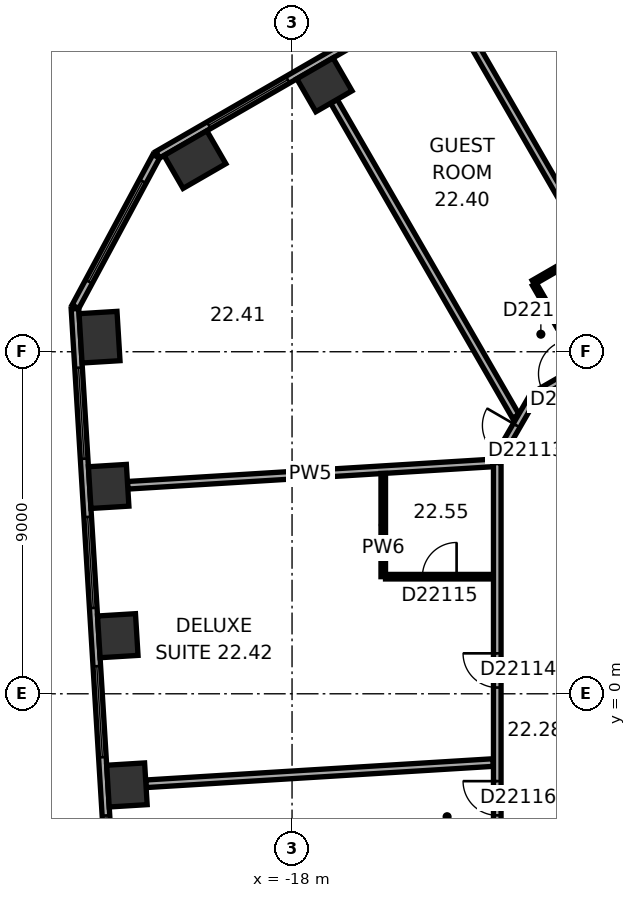
"""IFC4 building model, lengths in metres.
Left out: names, types, materials, properties, quantities, classifications, styles, units other than length and angle.
Written with IfcOpenShell. Run it as: python <this file> out.ifc"""

import sys

from ifc_helpers import new_model, si_unit, direction, frame, frame_2d, origin, origin_2d, place, context, subcontext, project, spatial, rectangle, extrude, element, fill, save


model = new_model("IFC4")
c1 = context("Model", 3, precision=1e-05, world=origin(), true_north=direction((0.0, 1.0)))
c2 = subcontext(c1, "Body", "Model", "MODEL_VIEW")
j1 = project(units=[si_unit("LENGTHUNIT", "METRE"), si_unit("PLANEANGLEUNIT", "RADIAN")], contexts=[c1])
p1 = place(None, origin())
s1 = spatial("IfcSite", under=j1, at=p1, CompositionType="ELEMENT")
p2 = place(p1, origin())
s2 = spatial("IfcBuilding", under=s1, at=p2, CompositionType="ELEMENT")
p3 = place(p2, frame((0.0, 0.0, 96.8)))
s3 = spatial("IfcBuildingStorey", under=s2, at=p3, CompositionType="ELEMENT", Elevation=96.8)
p4 = place(p3, frame((-17.148, 16.023, 0.0), z_axis=(0.0, 0.0, 1.0), x_axis=(-0.866025403784, -0.5, 0.0)))
e1 = element("IfcColumn", 1, at=p4, inside=s3, PredefinedType="COLUMN", context=c2, shape_type="SweptSolid", body=[
    extrude(rectangle(XDim=1.1, YDim=1.0, at=origin_2d()), origin(), (0.0, 0.0, 1.0), 3.3),
])
for number, where, z_axis, x_axis in (
    (2, (-20.555, 14.055, 0.0), (0.0, 0.0, 1.0), (-0.866, -0.5, 0.0)),
    (3, (-23.066, 9.383, 0.0), (0.0, 0.0, 1.0), (0.061, -0.998, 0.0)),
):
    element("IfcColumn", number, at=place(p3, frame(where, z_axis=z_axis, x_axis=x_axis)), inside=s3, PredefinedType="COLUMN", context=c2, shape_type="SweptSolid", body=[
        extrude(rectangle(XDim=1.3, YDim=1.0, at=origin_2d()), origin(), (0.0, 0.0, 1.0), 3.3),
    ])
for number, where, z_axis, x_axis in (
    (4, (-22.826, 5.456, 0.0), (0.0, 0.0, 1.0), (0.061, -0.998, 0.0)),
    (5, (-22.585, 1.529, 0.0), (0.0, 0.0, 1.0), (0.061, -0.998, 0.0)),
    (6, (-22.345, -2.399, 0.0), (0.0, 0.0, 1.0), (0.061, -0.998, 0.0)),
):
    element("IfcColumn", number, at=place(p3, frame(where, z_axis=z_axis, x_axis=x_axis)), inside=s3, PredefinedType="COLUMN", context=c2, shape_type="SweptSolid", body=[
        extrude(rectangle(XDim=1.1, YDim=1.0, at=origin_2d()), origin(), (0.0, 0.0, 1.0), 3.3),
    ])
p5 = place(p3, frame((-3.136, 24.805, 0.0), z_axis=(0.0, 0.0, 1.0), x_axis=(-0.866028291626, -0.499994998079, 0.0)))
e7 = element("IfcWall", 7, at=p5, inside=s3, PredefinedType="STANDARD", context=c2, shape_type="SweptSolid", body=[
    extrude(rectangle(XDim=21.246, YDim=0.2, at=frame_2d((10.623, 0.0))), origin(), (0.0, 0.0, 1.0), 3.3),
])
p6 = place(p5, frame((1.555, 0.0, 0.8)))
e8 = element("IfcOpeningElement", 8, at=p6, cuts=e7, PredefinedType="OPENING", context=c2, shape_type="SweptSolid", body=[
    extrude(rectangle(XDim=2.4, YDim=1.7, at=frame_2d((1.2, 0.85))), frame((0.0, 0.11, 0.0), z_axis=(0.0, -1.0, 0.0), x_axis=(1.0, 0.0, 0.0)), (0.0, 0.0, 1.0), 0.22),
])
p7 = place(p5, frame((5.489, 0.0, 0.8)))
e9 = element("IfcOpeningElement", 9, at=p7, cuts=e7, PredefinedType="OPENING", context=c2, shape_type="SweptSolid", body=[
    extrude(rectangle(XDim=2.4, YDim=1.7, at=frame_2d((1.2, 0.85))), frame((0.0, 0.11, 0.0), z_axis=(0.0, -1.0, 0.0), x_axis=(1.0, 0.0, 0.0)), (0.0, 0.0, 1.0), 0.22),
])
p8 = place(p5, frame((9.424, 0.0, 0.8)))
e10 = element("IfcOpeningElement", 10, at=p8, cuts=e7, PredefinedType="OPENING", context=c2, shape_type="SweptSolid", body=[
    extrude(rectangle(XDim=2.4, YDim=1.7, at=frame_2d((1.2, 0.85))), frame((0.0, 0.11, 0.0), z_axis=(0.0, -1.0, 0.0), x_axis=(1.0, 0.0, 0.0)), (0.0, 0.0, 1.0), 0.22),
])
p9 = place(p5, frame((13.358, 0.0, 0.8)))
e11 = element("IfcOpeningElement", 11, at=p9, cuts=e7, PredefinedType="OPENING", context=c2, shape_type="SweptSolid", body=[
    extrude(rectangle(XDim=2.4, YDim=1.7, at=frame_2d((1.2, 0.85))), frame((0.0, 0.11, 0.0), z_axis=(0.0, -1.0, 0.0), x_axis=(1.0, 0.0, 0.0)), (0.0, 0.0, 1.0), 0.22),
])
p10 = place(p5, frame((17.293, 0.0, 0.8)))
e12 = element("IfcOpeningElement", 12, at=p10, cuts=e7, PredefinedType="OPENING", context=c2, shape_type="SweptSolid", body=[
    extrude(rectangle(XDim=2.4, YDim=1.7, at=frame_2d((1.2, 0.85))), frame((0.0, 0.11, 0.0), z_axis=(0.0, -1.0, 0.0), x_axis=(1.0, 0.0, 0.0)), (0.0, 0.0, 1.0), 0.22),
])
p11 = place(p3, frame((-21.574, 14.143, 0.0), z_axis=(0.0, 0.0, 1.0), x_axis=(-0.473292949472, -0.880905093628, 0.0)))
e13 = element("IfcWall", 13, at=p11, inside=s3, PredefinedType="STANDARD", context=c2, shape_type="SweptSolid", body=[
    extrude(rectangle(XDim=4.494, YDim=0.2, at=frame_2d((2.247, 0.0))), origin(), (0.0, 0.0, 1.0), 3.3),
])
p12 = place(p11, frame((0.747, 0.0, 0.8)))
e14 = element("IfcOpeningElement", 14, at=p12, cuts=e13, PredefinedType="OPENING", context=c2, shape_type="SweptSolid", body=[
    extrude(rectangle(XDim=3.0, YDim=1.7, at=frame_2d((1.5, 0.85))), frame((0.0, 0.11, 0.0), z_axis=(0.0, -1.0, 0.0), x_axis=(1.0, 0.0, 0.0)), (0.0, 0.0, 1.0), 0.22),
])
p13 = place(p3, frame((-23.713, 10.131, 0.0), z_axis=(0.0, 0.0, 1.0), x_axis=(0.061040439785, -0.998135293791, 0.0)))
e15 = element("IfcWall", 15, at=p13, inside=s3, PredefinedType="STANDARD", context=c2, shape_type="SweptSolid", body=[
    extrude(rectangle(XDim=21.246, YDim=0.2, at=frame_2d((10.623, 0.0))), origin(), (0.0, 0.0, 1.0), 3.3),
])
p14 = place(p13, frame((1.553, 0.0, 0.8)))
e16 = element("IfcOpeningElement", 16, at=p14, cuts=e15, PredefinedType="OPENING", context=c2, shape_type="SweptSolid", body=[
    extrude(rectangle(XDim=2.4, YDim=1.7, at=frame_2d((1.2, 0.85))), frame((0.0, 0.11, 0.0), z_axis=(0.0, -1.0, 0.0), x_axis=(1.0, 0.0, 0.0)), (0.0, 0.0, 1.0), 0.22),
])
p15 = place(p13, frame((5.488, 0.0, 0.8)))
e17 = element("IfcOpeningElement", 17, at=p15, cuts=e15, PredefinedType="OPENING", context=c2, shape_type="SweptSolid", body=[
    extrude(rectangle(XDim=2.4, YDim=1.7, at=frame_2d((1.2, 0.85))), frame((0.0, 0.11, 0.0), z_axis=(0.0, -1.0, 0.0), x_axis=(1.0, 0.0, 0.0)), (0.0, 0.0, 1.0), 0.22),
])
p16 = place(p13, frame((9.422, 0.0, 0.8)))
e18 = element("IfcOpeningElement", 18, at=p16, cuts=e15, PredefinedType="OPENING", context=c2, shape_type="SweptSolid", body=[
    extrude(rectangle(XDim=2.4, YDim=1.7, at=frame_2d((1.2, 0.85))), frame((0.0, 0.11, 0.0), z_axis=(0.0, -1.0, 0.0), x_axis=(1.0, 0.0, 0.0)), (0.0, 0.0, 1.0), 0.22),
])
p17 = place(p13, frame((13.357, 0.0, 0.8)))
e19 = element("IfcOpeningElement", 19, at=p17, cuts=e15, PredefinedType="OPENING", context=c2, shape_type="SweptSolid", body=[
    extrude(rectangle(XDim=2.4, YDim=1.7, at=frame_2d((1.2, 0.85))), frame((0.0, 0.11, 0.0), z_axis=(0.0, -1.0, 0.0), x_axis=(1.0, 0.0, 0.0)), (0.0, 0.0, 1.0), 0.22),
])
p18 = place(p13, frame((17.292, 0.0, 0.8)))
e20 = element("IfcOpeningElement", 20, at=p18, cuts=e15, PredefinedType="OPENING", context=c2, shape_type="SweptSolid", body=[
    extrude(rectangle(XDim=2.4, YDim=1.7, at=frame_2d((1.2, 0.85))), frame((0.0, 0.11, 0.0), z_axis=(0.0, -1.0, 0.0), x_axis=(1.0, 0.0, 0.0)), (0.0, 0.0, 1.0), 0.22),
])
p19 = place(p3, frame((-22.327, 5.486, 0.0), z_axis=(0.0, 0.0, 1.0), x_axis=(0.998135194863, 0.061042057435, 0.0)))
e21 = element("IfcWall", 21, at=p19, inside=s3, PredefinedType="PARTITIONING", context=c2, shape_type="SweptSolid", body=[
    extrude(rectangle(XDim=9.635, YDim=0.2, at=frame_2d((4.817, 0.0))), origin(), (0.0, 0.0, 1.0), 3.05),
])
p20 = place(p3, frame((-21.846, -2.368, 0.0), z_axis=(0.0, 0.0, 1.0), x_axis=(0.998134617584, 0.061051496129, 0.0)))
e22 = element("IfcWall", 22, at=p20, inside=s3, PredefinedType="PARTITIONING", context=c2, shape_type="SweptSolid", body=[
    extrude(rectangle(XDim=9.154, YDim=0.2, at=frame_2d((4.577, 0.0))), origin(), (0.0, 0.0, 1.0), 3.05),
])
p21 = place(p3, frame((-16.898, 15.59, 0.0), z_axis=(0.0, 0.0, 1.0), x_axis=(0.500023458698, -0.866011859475, 0.0)))
e23 = element("IfcWall", 23, at=p21, inside=s3, PredefinedType="PARTITIONING", context=c2, shape_type="SweptSolid", body=[
    extrude(rectangle(XDim=9.572, YDim=0.2, at=frame_2d((4.786, 0.0))), origin(), (0.0, 0.0, 1.0), 3.05),
])
p22 = place(p3, frame((-15.6, 3.081, 0.0), z_axis=(0.0, 0.0, 1.0), x_axis=(0.0, 1.0, 0.0)))
e24 = element("IfcWall", 24, at=p22, inside=s3, PredefinedType="PARTITIONING", context=c2, shape_type="SweptSolid", body=[
    extrude(rectangle(XDim=2.716, YDim=0.12, at=frame_2d((1.358, 0.0))), origin(), (0.0, 0.0, 1.0), 3.05),
])
p23 = place(p3, frame((-12.7, 3.081, 0.0), z_axis=(0.0, 0.0, 1.0), x_axis=(-1.0, 0.0, 0.0)))
e25 = element("IfcWall", 25, at=p23, inside=s3, PredefinedType="PARTITIONING", context=c2, shape_type="SweptSolid", body=[
    extrude(rectangle(XDim=2.84, YDim=0.12, at=frame_2d((1.42, 0.0))), origin(), (0.0, 0.0, 1.0), 3.05),
])
p24 = place(p23, frame((0.97, 0.0, 0.0)))
e26 = element("IfcOpeningElement", 26, at=p24, cuts=e25, PredefinedType="OPENING", context=c2, shape_type="SweptSolid", body=[
    extrude(rectangle(XDim=0.9, YDim=2.1, at=frame_2d((0.45, 1.05))), frame((0.0, 0.07, 0.0), z_axis=(0.0, -1.0, 0.0), x_axis=(1.0, 0.0, 0.0)), (0.0, 0.0, 1.0), 0.14),
])
p25 = place(p3, frame((-12.6, 6.081, 0.0), z_axis=(0.0, 0.0, 1.0), x_axis=(0.0, -1.0, 0.0)))
e27 = element("IfcWall", 27, at=p25, inside=s3, PredefinedType="PARTITIONING", context=c2, shape_type="SweptSolid", body=[
    extrude(rectangle(XDim=12.219, YDim=0.2, at=frame_2d((6.109, 0.0))), origin(), (0.0, 0.0, 1.0), 3.05),
])
p26 = place(p25, frame((5.017, 0.0, 0.0)))
e28 = element("IfcOpeningElement", 28, at=p26, cuts=e27, PredefinedType="OPENING", context=c2, shape_type="SweptSolid", body=[
    extrude(rectangle(XDim=0.9, YDim=2.1, at=frame_2d((0.45, 1.05))), frame((0.0, 0.11, 0.0), z_axis=(0.0, -1.0, 0.0), x_axis=(1.0, 0.0, 0.0)), (0.0, 0.0, 1.0), 0.22),
])
p27 = place(p25, frame((8.38, 0.0, 0.0)))
e29 = element("IfcOpeningElement", 29, at=p27, cuts=e27, PredefinedType="OPENING", context=c2, shape_type="SweptSolid", body=[
    extrude(rectangle(XDim=0.9, YDim=2.1, at=frame_2d((0.45, 1.05))), frame((0.0, 0.11, 0.0), z_axis=(0.0, -1.0, 0.0), x_axis=(1.0, 0.0, 0.0)), (0.0, 0.0, 1.0), 0.22),
])
p28 = place(p3, frame((-11.65, 7.823, 0.0), z_axis=(0.0, 0.0, 1.0), x_axis=(-0.500063520245, -0.865988727248, 0.0)))
e30 = element("IfcWall", 30, at=p28, inside=s3, PredefinedType="PARTITIONING", context=c2, shape_type="SweptSolid", body=[
    extrude(rectangle(XDim=1.9, YDim=0.2, at=frame_2d((0.95, 0.0))), origin(), (0.0, 0.0, 1.0), 3.05),
])
p29 = place(p28, frame((0.882, 0.0, 0.0)))
e31 = element("IfcOpeningElement", 31, at=p29, cuts=e30, PredefinedType="OPENING", context=c2, shape_type="SweptSolid", body=[
    extrude(rectangle(XDim=0.9, YDim=2.1, at=frame_2d((0.45, 1.05))), frame((0.0, 0.11, 0.0), z_axis=(0.0, -1.0, 0.0), x_axis=(1.0, 0.0, 0.0)), (0.0, 0.0, 1.0), 0.22),
])
p30 = place(p3, frame((-11.651, 10.825, 0.0), z_axis=(0.0, 0.0, 1.0), x_axis=(0.865998477143, 0.500046635412, 0.0)))
e32 = element("IfcWall", 32, at=p30, inside=s3, PredefinedType="PARTITIONING", context=c2, shape_type="SweptSolid", body=[
    extrude(rectangle(XDim=1.673, YDim=0.12, at=frame_2d((0.836, 0.0))), origin(), (0.0, 0.0, 1.0), 3.05),
])
p31 = place(p3, frame((-10.401, 8.66, 0.0), z_axis=(0.0, 0.0, 1.0), x_axis=(-0.500077547548, 0.865980627057, 0.0)))
e33 = element("IfcWall", 33, at=p31, inside=s3, PredefinedType="PARTITIONING", context=c2, shape_type="SweptSolid", body=[
    extrude(rectangle(XDim=2.44, YDim=0.12, at=frame_2d((1.22, 0.0))), origin(), (0.0, 0.0, 1.0), 3.05),
])
p32 = place(p31, frame((0.77, 0.0, 0.0)))
e34 = element("IfcOpeningElement", 34, at=p32, cuts=e33, PredefinedType="OPENING", context=c2, shape_type="SweptSolid", body=[
    extrude(rectangle(XDim=0.9, YDim=2.1, at=frame_2d((0.45, 1.05))), frame((0.0, 0.07, 0.0), z_axis=(0.0, -1.0, 0.0), x_axis=(1.0, 0.0, 0.0)), (0.0, 0.0, 1.0), 0.14),
])
p33 = place(p3, frame((-8.902, 9.41, 0.0), z_axis=(0.0, 0.0, 1.0), x_axis=(-0.866014299198, -0.500019233215, 0.0)))
e35 = element("IfcWall", 35, at=p33, inside=s3, PredefinedType="PARTITIONING", context=c2, shape_type="SweptSolid", body=[
    extrude(rectangle(XDim=3.133, YDim=0.2, at=frame_2d((1.567, 0.0))), origin(), (0.0, 0.0, 1.0), 3.05),
])
p34 = place(p33, frame((1.978, 0.0, 0.0)))
e36 = element("IfcOpeningElement", 36, at=p34, cuts=e35, PredefinedType="OPENING", context=c2, shape_type="SweptSolid", body=[
    extrude(rectangle(XDim=0.9, YDim=2.1, at=frame_2d((0.45, 1.05))), frame((0.0, 0.11, 0.0), z_axis=(0.0, -1.0, 0.0), x_axis=(1.0, 0.0, 0.0)), (0.0, 0.0, 1.0), 0.22),
])
p35 = place(p3, frame((-7.865, 7.814, 0.0), z_axis=(0.0, 0.0, 1.0), x_axis=(-0.500004234368, 0.866022959057, 0.0)))
e37 = element("IfcWall", 37, at=p35, inside=s3, PredefinedType="PARTITIONING", context=c2, shape_type="SweptSolid", body=[
    extrude(rectangle(XDim=11.25, YDim=0.2, at=frame_2d((5.625, 0.0))), origin(), (0.0, 0.0, 1.0), 3.05),
])
p36 = place(p35, frame((0.5, 0.0, 0.0)))
e38 = element("IfcOpeningElement", 38, at=p36, cuts=e37, PredefinedType="OPENING", context=c2, shape_type="SweptSolid", body=[
    extrude(rectangle(XDim=0.9, YDim=2.1, at=frame_2d((0.45, 1.05))), frame((0.0, 0.11, 0.0), z_axis=(0.0, -1.0, 0.0), x_axis=(1.0, 0.0, 0.0)), (0.0, 0.0, 1.0), 0.22),
])
p37 = place(p10, origin())
e39 = element("IfcWindow", 39, at=p37, inside=s3, PartitioningType="SINGLE_PANEL", PredefinedType="WINDOW", context=c2, shape_type="SweptSolid", body=[
    extrude(rectangle(XDim=2.4, YDim=1.7, at=frame_2d((1.2, 0.85))), frame((0.0, 0.03, 0.0), z_axis=(0.0, -1.0, 0.0), x_axis=(1.0, 0.0, 0.0)), (0.0, 0.0, 1.0), 0.06),
])
fill(e12, e39)
p38 = place(p12, origin())
e40 = element("IfcWindow", 40, at=p38, inside=s3, PartitioningType="SINGLE_PANEL", PredefinedType="WINDOW", context=c2, shape_type="SweptSolid", body=[
    extrude(rectangle(XDim=3.0, YDim=1.7, at=frame_2d((1.5, 0.85))), frame((0.0, 0.03, 0.0), z_axis=(0.0, -1.0, 0.0), x_axis=(1.0, 0.0, 0.0)), (0.0, 0.0, 1.0), 0.06),
])
fill(e14, e40)
p39 = place(p14, origin())
e41 = element("IfcWindow", 41, at=p39, inside=s3, PartitioningType="SINGLE_PANEL", PredefinedType="WINDOW", context=c2, shape_type="SweptSolid", body=[
    extrude(rectangle(XDim=2.4, YDim=1.7, at=frame_2d((1.2, 0.85))), frame((0.0, 0.03, 0.0), z_axis=(0.0, -1.0, 0.0), x_axis=(1.0, 0.0, 0.0)), (0.0, 0.0, 1.0), 0.06),
])
fill(e16, e41)
p40 = place(p15, origin())
e42 = element("IfcWindow", 42, at=p40, inside=s3, PartitioningType="SINGLE_PANEL", PredefinedType="WINDOW", context=c2, shape_type="SweptSolid", body=[
    extrude(rectangle(XDim=2.4, YDim=1.7, at=frame_2d((1.2, 0.85))), frame((0.0, 0.03, 0.0), z_axis=(0.0, -1.0, 0.0), x_axis=(1.0, 0.0, 0.0)), (0.0, 0.0, 1.0), 0.06),
])
fill(e17, e42)
p41 = place(p16, origin())
e43 = element("IfcWindow", 43, at=p41, inside=s3, PartitioningType="SINGLE_PANEL", PredefinedType="WINDOW", context=c2, shape_type="SweptSolid", body=[
    extrude(rectangle(XDim=2.4, YDim=1.7, at=frame_2d((1.2, 0.85))), frame((0.0, 0.03, 0.0), z_axis=(0.0, -1.0, 0.0), x_axis=(1.0, 0.0, 0.0)), (0.0, 0.0, 1.0), 0.06),
])
fill(e18, e43)
p42 = place(p17, origin())
e44 = element("IfcWindow", 44, at=p42, inside=s3, PartitioningType="SINGLE_PANEL", PredefinedType="WINDOW", context=c2, shape_type="SweptSolid", body=[
    extrude(rectangle(XDim=2.4, YDim=1.7, at=frame_2d((1.2, 0.85))), frame((0.0, 0.03, 0.0), z_axis=(0.0, -1.0, 0.0), x_axis=(1.0, 0.0, 0.0)), (0.0, 0.0, 1.0), 0.06),
])
fill(e19, e44)
p43 = place(p34, origin())
e45 = element("IfcDoor", 45, at=p43, inside=s3, OperationType="SINGLE_SWING_LEFT", PredefinedType="DOOR", context=c2, shape_type="SweptSolid", body=[
    extrude(rectangle(XDim=0.9, YDim=2.1, at=frame_2d((0.45, 1.05))), frame((0.0, 0.025, 0.0), z_axis=(0.0, -1.0, 0.0), x_axis=(1.0, 0.0, 0.0)), (0.0, 0.0, 1.0), 0.05),
])
fill(e36, e45)
p44 = place(p32, origin())
e46 = element("IfcDoor", 46, at=p44, inside=s3, OperationType="SINGLE_SWING_LEFT", PredefinedType="DOOR", context=c2, shape_type="SweptSolid", body=[
    extrude(rectangle(XDim=0.9, YDim=2.1, at=frame_2d((0.45, 1.05))), frame((0.0, 0.025, 0.0), z_axis=(0.0, -1.0, 0.0), x_axis=(1.0, 0.0, 0.0)), (0.0, 0.0, 1.0), 0.05),
])
fill(e34, e46)
p45 = place(p29, origin())
e47 = element("IfcDoor", 47, at=p45, inside=s3, OperationType="SINGLE_SWING_LEFT", PredefinedType="DOOR", context=c2, shape_type="SweptSolid", body=[
    extrude(rectangle(XDim=0.9, YDim=2.1, at=frame_2d((0.45, 1.05))), frame((0.0, 0.025, 0.0), z_axis=(0.0, -1.0, 0.0), x_axis=(1.0, 0.0, 0.0)), (0.0, 0.0, 1.0), 0.05),
])
fill(e31, e47)
p46 = place(p26, origin())
e48 = element("IfcDoor", 48, at=p46, inside=s3, OperationType="SINGLE_SWING_LEFT", PredefinedType="DOOR", context=c2, shape_type="SweptSolid", body=[
    extrude(rectangle(XDim=0.9, YDim=2.1, at=frame_2d((0.45, 1.05))), frame((0.0, 0.025, 0.0), z_axis=(0.0, -1.0, 0.0), x_axis=(1.0, 0.0, 0.0)), (0.0, 0.0, 1.0), 0.05),
])
fill(e28, e48)
p47 = place(p24, origin())
e49 = element("IfcDoor", 49, at=p47, inside=s3, OperationType="SINGLE_SWING_LEFT", PredefinedType="DOOR", context=c2, shape_type="SweptSolid", body=[
    extrude(rectangle(XDim=0.9, YDim=2.1, at=frame_2d((0.45, 1.05))), frame((0.0, 0.025, 0.0), z_axis=(0.0, -1.0, 0.0), x_axis=(1.0, 0.0, 0.0)), (0.0, 0.0, 1.0), 0.05),
])
fill(e26, e49)
p48 = place(p27, origin())
e50 = element("IfcDoor", 50, at=p48, inside=s3, OperationType="SINGLE_SWING_LEFT", PredefinedType="DOOR", context=c2, shape_type="SweptSolid", body=[
    extrude(rectangle(XDim=0.9, YDim=2.1, at=frame_2d((0.45, 1.05))), frame((0.0, 0.025, 0.0), z_axis=(0.0, -1.0, 0.0), x_axis=(1.0, 0.0, 0.0)), (0.0, 0.0, 1.0), 0.05),
])
fill(e29, e50)
save(model, sys.argv[1])
